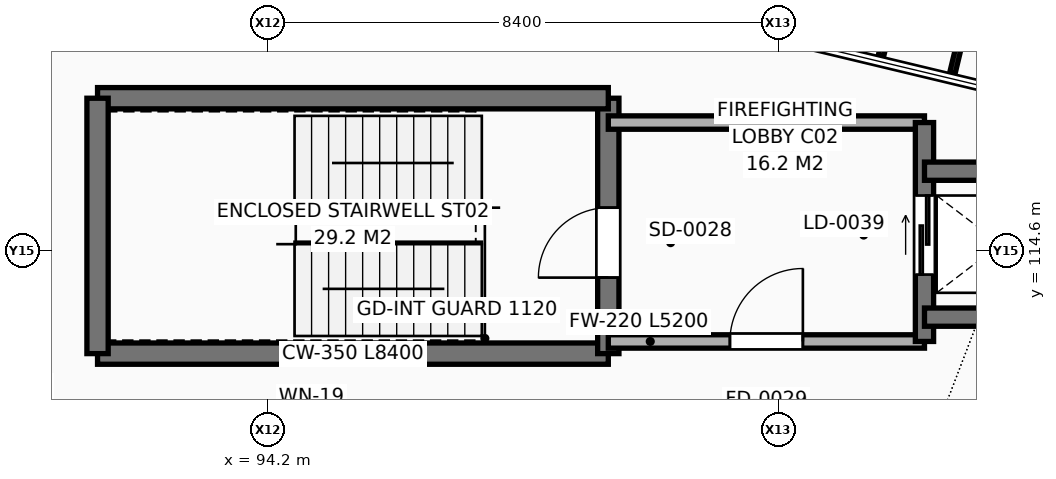
"""IFC4 building model, lengths in metres.
Left out: names, types, materials, properties, quantities, classifications, styles, units other than length and angle.
Written with IfcOpenShell. Run it as: python <this file> out.ifc"""

import sys

from ifc_helpers import new_model, si_unit, direction, frame, frame_2d, origin, place, context, subcontext, project, spatial, rectangle, extrude, element, fill, save


model = new_model("IFC4")
c1 = context("Model", 3, precision=1e-05, world=origin(), true_north=direction((0.0, 1.0)))
c2 = subcontext(c1, "Body", "Model", "MODEL_VIEW")
j1 = project(units=[si_unit("LENGTHUNIT", "METRE"), si_unit("PLANEANGLEUNIT", "RADIAN")], contexts=[c1])
p1 = place(None, origin())
s1 = spatial("IfcSite", under=j1, at=p1, CompositionType="ELEMENT")
p2 = place(p1, origin())
s2 = spatial("IfcBuilding", under=s1, at=p2, CompositionType="ELEMENT")
p3 = place(p2, frame((0.0, 0.0, 13.8)))
s3 = spatial("IfcBuildingStorey", under=s2, at=p3, CompositionType="ELEMENT", Elevation=13.8)
p4 = place(p3, frame((98.971, 111.498, 0.0), z_axis=(0.0, 0.0, 1.0), x_axis=(-0.999198222714, 0.040036380023, 0.0)))
e1 = element("IfcWall", 1, at=p4, inside=s3, PredefinedType="SOLIDWALL", context=c2, shape_type="SweptSolid", body=[
    extrude(rectangle(XDim=12.983, YDim=0.34, at=frame_2d((6.491, 0.0))), origin(), (0.0, 0.0, 1.0), 3.387),
])
p5 = place(p4, frame((3.327, 0.0, 0.9)))
e2 = element("IfcOpeningElement", 2, at=p5, cuts=e1, PredefinedType="OPENING", context=c2, shape_type="SweptSolid", body=[
    extrude(rectangle(XDim=1.5, YDim=1.8, at=frame_2d((0.75, 0.9))), frame((0.0, 0.18, 0.0), z_axis=(0.0, -1.0, 0.0), x_axis=(1.0, 0.0, 0.0)), (0.0, 0.0, 1.0), 0.36),
])
p6 = place(p4, frame((8.155, 0.0, 0.9)))
e3 = element("IfcOpeningElement", 3, at=p6, cuts=e1, PredefinedType="OPENING", context=c2, shape_type="SweptSolid", body=[
    extrude(rectangle(XDim=1.5, YDim=1.8, at=frame_2d((0.75, 0.9))), frame((0.0, 0.18, 0.0), z_axis=(0.0, -1.0, 0.0), x_axis=(1.0, 0.0, 0.0)), (0.0, 0.0, 1.0), 0.36),
])
p7 = place(p3, frame((91.4, 112.9, 0.0), z_axis=(0.0, 0.0, 1.0), x_axis=(1.0, 0.0, 0.0)))
e4 = element("IfcWall", 4, at=p7, inside=s3, PredefinedType="SHEAR", context=c2, shape_type="SweptSolid", body=[
    extrude(rectangle(XDim=8.4, YDim=0.35, at=frame_2d((4.2, 0.0))), origin(), (0.0, 0.0, 1.0), 3.92),
])
p8 = place(p3, frame((99.8, 112.9, 0.0), z_axis=(0.0, 0.0, 1.0), x_axis=(0.0, 1.0, 0.0)))
e5 = element("IfcWall", 5, at=p8, inside=s3, PredefinedType="SHEAR", context=c2, shape_type="SweptSolid", body=[
    extrude(rectangle(XDim=4.2, YDim=0.35, at=frame_2d((2.1, 0.0))), origin(), (0.0, 0.0, 1.0), 3.92),
])
p9 = place(p8, frame((1.25, 0.0, 0.0)))
e6 = element("IfcOpeningElement", 6, at=p9, cuts=e5, PredefinedType="OPENING", context=c2, shape_type="SweptSolid", body=[
    extrude(rectangle(XDim=1.15, YDim=2.2, at=frame_2d((0.575, 1.1))), frame((0.0, 0.185, 0.0), z_axis=(0.0, -1.0, 0.0), x_axis=(1.0, 0.0, 0.0)), (0.0, 0.0, 1.0), 0.37),
])
p10 = place(p3, frame((99.8, 117.1, 0.0), z_axis=(0.0, 0.0, 1.0), x_axis=(-1.0, 0.0, 0.0)))
e7 = element("IfcWall", 7, at=p10, inside=s3, PredefinedType="SHEAR", context=c2, shape_type="SweptSolid", body=[
    extrude(rectangle(XDim=8.4, YDim=0.35, at=frame_2d((4.2, 0.0))), origin(), (0.0, 0.0, 1.0), 3.92),
])
p11 = place(p3, frame((91.4, 117.1, 0.0), z_axis=(0.0, 0.0, 1.0), x_axis=(0.0, -1.0, 0.0)))
e8 = element("IfcWall", 8, at=p11, inside=s3, PredefinedType="SHEAR", context=c2, shape_type="SweptSolid", body=[
    extrude(rectangle(XDim=4.2, YDim=0.35, at=frame_2d((2.1, 0.0))), origin(), (0.0, 0.0, 1.0), 3.92),
])
p12 = place(p3, frame((99.8, 113.1, 0.0), z_axis=(0.0, 0.0, 1.0), x_axis=(1.0, 0.0, 0.0)))
e9 = element("IfcWall", 9, at=p12, inside=s3, PredefinedType="SOLIDWALL", context=c2, shape_type="SweptSolid", body=[
    extrude(rectangle(XDim=5.2, YDim=0.22, at=frame_2d((2.6, 0.0))), origin(), (0.0, 0.0, 1.0), 3.92),
])
p13 = place(p12, frame((2.0, 0.0, 0.0)))
e10 = element("IfcOpeningElement", 10, at=p13, cuts=e9, PredefinedType="OPENING", context=c2, shape_type="SweptSolid", body=[
    extrude(rectangle(XDim=1.2, YDim=2.2, at=frame_2d((0.6, 1.1))), frame((0.0, 0.12, 0.0), z_axis=(0.0, -1.0, 0.0), x_axis=(1.0, 0.0, 0.0)), (0.0, 0.0, 1.0), 0.24),
])
p14 = place(p3, frame((105.0, 116.7, 0.0), z_axis=(0.0, 0.0, 1.0), x_axis=(-1.0, 0.0, 0.0)))
e11 = element("IfcWall", 11, at=p14, inside=s3, PredefinedType="SOLIDWALL", context=c2, shape_type="SweptSolid", body=[
    extrude(rectangle(XDim=5.2, YDim=0.22, at=frame_2d((2.6, 0.0))), origin(), (0.0, 0.0, 1.0), 3.92),
])
p15 = place(p3, frame((105.0, 113.1, 0.0), z_axis=(0.0, 0.0, 1.0), x_axis=(0.0, 1.0, 0.0)))
e12 = element("IfcWall", 12, at=p15, inside=s3, PredefinedType="SHEAR", context=c2, shape_type="SweptSolid", body=[
    extrude(rectangle(XDim=3.6, YDim=0.3, at=frame_2d((1.8, 0.0))), origin(), (0.0, 0.0, 1.0), 3.92),
])
p16 = place(p15, frame((1.1, 0.0, 0.0)))
e13 = element("IfcOpeningElement", 13, at=p16, cuts=e12, PredefinedType="OPENING", context=c2, shape_type="SweptSolid", body=[
    extrude(rectangle(XDim=1.3, YDim=2.3, at=frame_2d((0.65, 1.15))), frame((0.0, 0.16, 0.0), z_axis=(0.0, -1.0, 0.0), x_axis=(1.0, 0.0, 0.0)), (0.0, 0.0, 1.0), 0.32),
])
for number, where, z_axis, x_axis in (
    (14, (107.5, 115.9, 0.0), (0.0, 0.0, 1.0), (-1.0, 0.0, 0.0)),
    (15, (105.0, 113.5, 0.0), (0.0, 0.0, 1.0), (1.0, 0.0, 0.0)),
):
    element("IfcWall", number, at=place(p3, frame(where, z_axis=z_axis, x_axis=x_axis)), inside=s3, PredefinedType="SHEAR", context=c2, shape_type="SweptSolid", body=[
        extrude(rectangle(XDim=2.5, YDim=0.3, at=frame_2d((1.25, 0.0))), origin(), (0.0, 0.0, 1.0), 3.92),
    ])
p17 = place(p9, origin())
e16 = element("IfcDoor", 16, at=p17, inside=s3, OperationType="SINGLE_SWING_LEFT", PredefinedType="DOOR", context=c2, shape_type="SweptSolid", body=[
    extrude(rectangle(XDim=1.15, YDim=2.2, at=frame_2d((0.575, 1.1))), frame((0.0, 0.025, 0.0), z_axis=(0.0, -1.0, 0.0), x_axis=(1.0, 0.0, 0.0)), (0.0, 0.0, 1.0), 0.05),
])
fill(e6, e16)
p18 = place(p13, origin())
e17 = element("IfcDoor", 17, at=p18, inside=s3, OperationType="SINGLE_SWING_RIGHT", PredefinedType="DOOR", context=c2, shape_type="SweptSolid", body=[
    extrude(rectangle(XDim=1.2, YDim=2.2, at=frame_2d((0.6, 1.1))), frame((0.0, 0.025, 0.0), z_axis=(0.0, -1.0, 0.0), x_axis=(1.0, 0.0, 0.0)), (0.0, 0.0, 1.0), 0.05),
])
fill(e10, e17)
p19 = place(p16, origin())
e18 = element("IfcDoor", 18, at=p19, inside=s3, OperationType="SLIDING_TO_LEFT", PredefinedType="DOOR", context=c2, shape_type="SweptSolid", body=[
    extrude(rectangle(XDim=1.3, YDim=2.3, at=frame_2d((0.65, 1.15))), frame((0.0, 0.025, 0.0), z_axis=(0.0, -1.0, 0.0), x_axis=(1.0, 0.0, 0.0)), (0.0, 0.0, 1.0), 0.05),
])
fill(e13, e18)
save(model, sys.argv[1])
